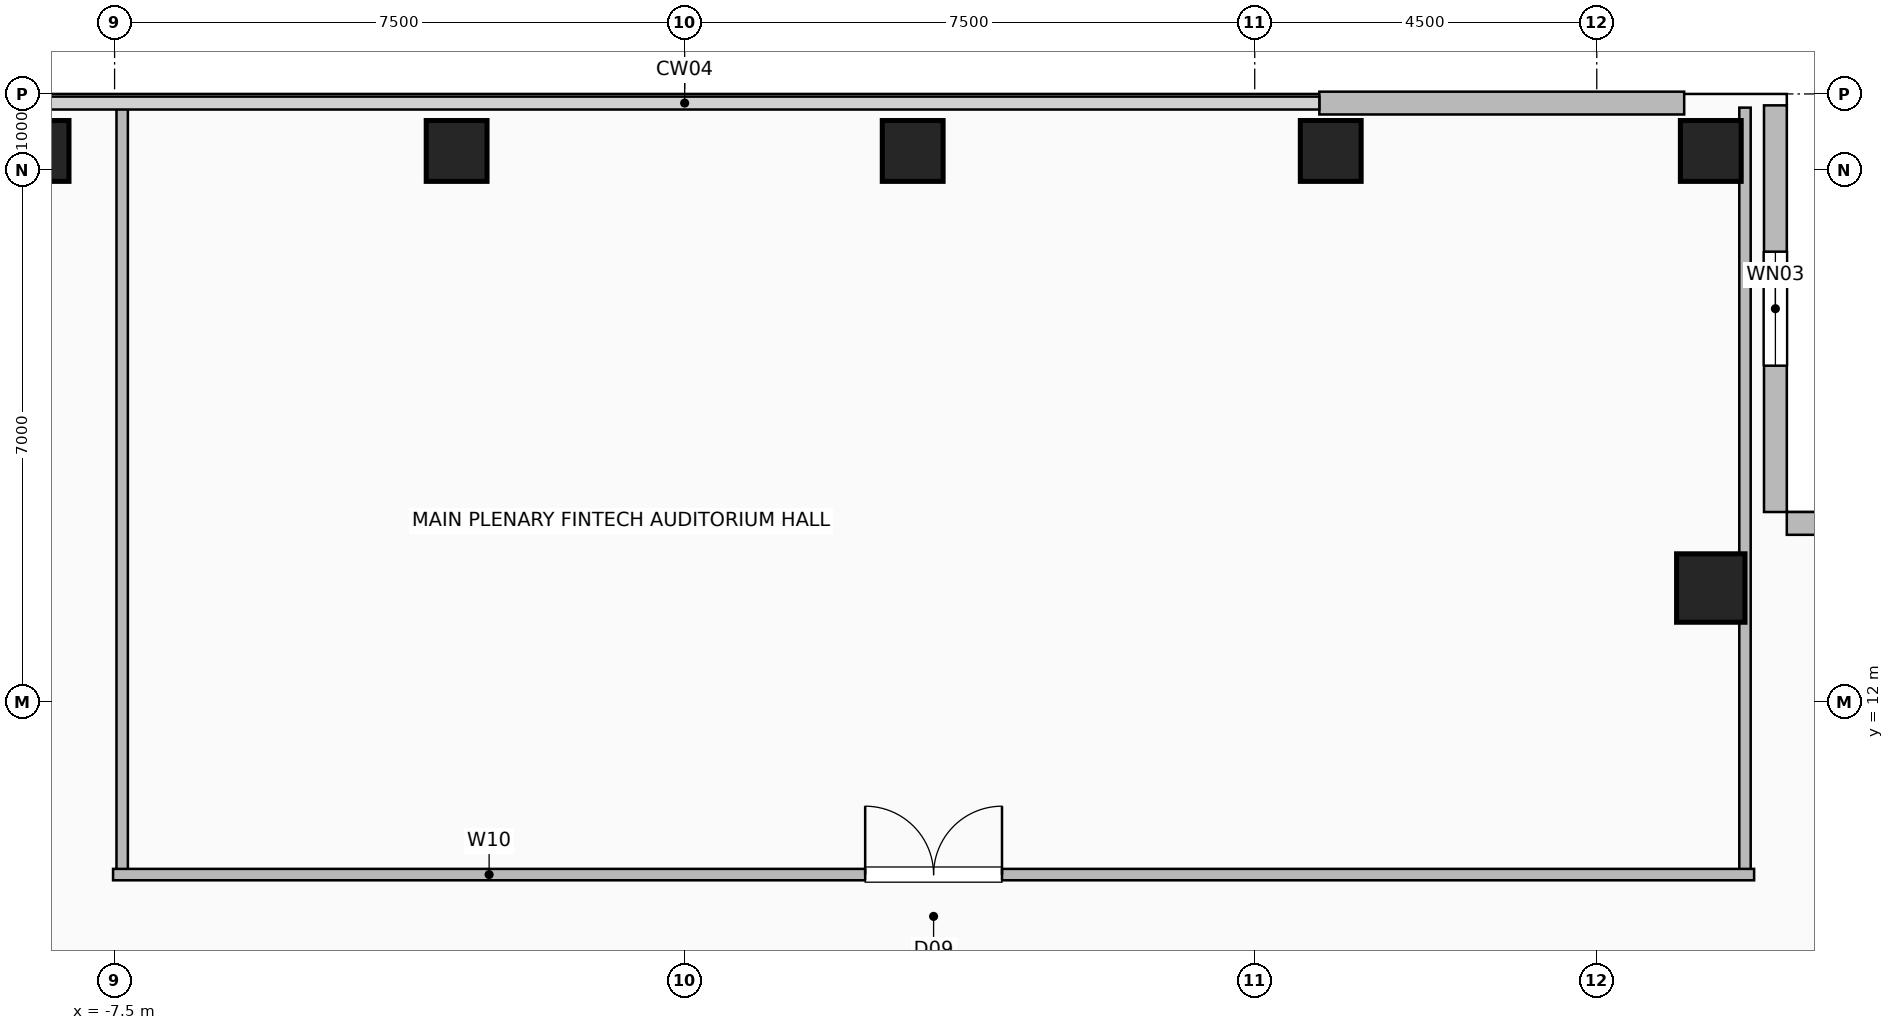
"""IFC4 building model, lengths in metres.
Left out: names, types, materials, properties, quantities, classifications, styles, units other than length and angle.
Written with IfcOpenShell. Run it as: python <this file> out.ifc"""

import sys

from ifc_helpers import new_model, si_unit, direction, frame, frame_2d, origin, origin_2d, place, context, subcontext, project, spatial, rectangle, hollow_rectangle, extrude, element, fill, save


model = new_model("IFC4")
c1 = context("Model", 3, precision=1e-05, world=origin(), true_north=direction((0.0, 1.0)))
c2 = subcontext(c1, "Body", "Model", "MODEL_VIEW")
j1 = project(units=[si_unit("LENGTHUNIT", "METRE"), si_unit("PLANEANGLEUNIT", "RADIAN")], contexts=[c1])
p1 = place(None, origin())
s1 = spatial("IfcSite", under=j1, at=p1, CompositionType="ELEMENT")
p2 = place(p1, origin())
s2 = spatial("IfcBuilding", under=s1, at=p2, CompositionType="ELEMENT")
p3 = place(p2, frame((0.0, 0.0, 213.0)))
s3 = spatial("IfcBuildingStorey", under=s2, at=p3, CompositionType="ELEMENT", Elevation=213.0)
for number, where, z_axis, x_axis in (
    (1, (-8.5, 19.25, 0.0), (0.0, 0.0, 1.0), (1.0, 0.0, 0.0)),
    (2, (-3.0, 19.25, 0.0), (0.0, 0.0, 1.0), (1.0, 0.0, 0.0)),
    (3, (3.0, 19.25, 0.0), (0.0, 0.0, 1.0), (1.0, 0.0, 0.0)),
    (4, (8.5, 19.25, 0.0), (0.0, 0.0, 1.0), (1.0, 0.0, 0.0)),
    (5, (13.5, 19.25, 0.0), (0.0, 0.0, 1.0), (1.0, 0.0, 0.0)),
):
    element("IfcColumn", number, at=place(p3, frame(where, z_axis=z_axis, x_axis=x_axis)), inside=s3, PredefinedType="COLUMN", context=c2, shape_type="SweptSolid", body=[
        extrude(hollow_rectangle(XDim=0.8, YDim=0.8, WallThickness=0.04, at=origin_2d()), origin(), (0.0, 0.0, 1.0), 3.6),
    ])
p4 = place(p3, frame((13.5, 13.5, 0.0), z_axis=(0.0, 0.0, 1.0), x_axis=(1.0, 0.0, 0.0)))
e6 = element("IfcColumn", 6, at=p4, inside=s3, PredefinedType="COLUMN", context=c2, shape_type="SweptSolid", body=[
    extrude(hollow_rectangle(XDim=0.9, YDim=0.9, WallThickness=0.045, at=origin_2d()), origin(), (0.0, 0.0, 1.0), 3.6),
])
p5 = place(p3, frame((8.35, 19.88, 0.0), z_axis=(0.0, 0.0, 1.0), x_axis=(1.0, 0.0, 0.0)))
e7 = element("IfcWall", 7, at=p5, inside=s3, PredefinedType="SOLIDWALL", context=c2, shape_type="SweptSolid", body=[
    extrude(rectangle(XDim=4.8, YDim=0.3, at=frame_2d((2.4, 0.0))), origin(), (0.0, 0.0, 1.0), 3.36),
])
p6 = place(p3, frame((14.35, 19.85, 0.0), z_axis=(0.0, 0.0, 1.0), x_axis=(0.0, -1.0, 0.0)))
e8 = element("IfcWall", 8, at=p6, inside=s3, PredefinedType="SOLIDWALL", context=c2, shape_type="SweptSolid", body=[
    extrude(rectangle(XDim=5.35, YDim=0.3, at=frame_2d((2.675, 0.0))), origin(), (0.0, 0.0, 1.0), 3.36),
])
p7 = place(p6, frame((1.925, 0.0, 0.9)))
e9 = element("IfcOpeningElement", 9, at=p7, cuts=e8, PredefinedType="OPENING", context=c2, shape_type="SweptSolid", body=[
    extrude(rectangle(XDim=1.5, YDim=1.8, at=frame_2d((0.75, 0.9))), frame((0.0, 0.16, 0.0), z_axis=(0.0, -1.0, 0.0), x_axis=(1.0, 0.0, 0.0)), (0.0, 0.0, 1.0), 0.32),
])
p8 = place(p3, frame((19.85, 14.35, 0.0), z_axis=(0.0, 0.0, 1.0), x_axis=(-1.0, 0.0, 0.0)))
e10 = element("IfcWall", 10, at=p8, inside=s3, PredefinedType="SOLIDWALL", context=c2, shape_type="SweptSolid", body=[
    extrude(rectangle(XDim=5.35, YDim=0.3, at=frame_2d((2.675, 0.0))), origin(), (0.0, 0.0, 1.0), 3.36),
])
for number, where, z_axis, x_axis in (
    (11, (-7.4, 9.73, 0.0), (0.0, 0.0, 1.0), (0.0, 1.0, 0.0)),
    (12, (13.95, 9.73, 0.0), (0.0, 0.0, 1.0), (0.0, 1.0, 0.0)),
):
    element("IfcWall", number, at=place(p3, frame(where, z_axis=z_axis, x_axis=x_axis)), inside=s3, PredefinedType="PARTITIONING", context=c2, shape_type="SweptSolid", body=[
        extrude(rectangle(XDim=10.09, YDim=0.15, at=frame_2d((5.045, 0.0))), origin(), (0.0, 0.0, 1.0), 3.36),
    ])
p9 = place(p3, frame((-7.52, 9.73, 0.0), z_axis=(0.0, 0.0, 1.0), x_axis=(1.0, 0.0, 0.0)))
e13 = element("IfcWall", 13, at=p9, inside=s3, PredefinedType="PARTITIONING", context=c2, shape_type="SweptSolid", body=[
    extrude(rectangle(XDim=21.59, YDim=0.15, at=frame_2d((10.795, 0.0))), origin(), (0.0, 0.0, 1.0), 3.36),
])
p10 = place(p9, frame((9.895, 0.0, 0.0)))
e14 = element("IfcOpeningElement", 14, at=p10, cuts=e13, PredefinedType="OPENING", context=c2, shape_type="SweptSolid", body=[
    extrude(rectangle(XDim=1.8, YDim=2.08, at=frame_2d((0.9, 1.04))), frame((0.0, 0.085, 0.0), z_axis=(0.0, -1.0, 0.0), x_axis=(1.0, 0.0, 0.0)), (0.0, 0.0, 1.0), 0.17),
])
p11 = place(p7, origin())
e15 = element("IfcWindow", 15, at=p11, inside=s3, PartitioningType="SINGLE_PANEL", PredefinedType="WINDOW", context=c2, shape_type="SweptSolid", body=[
    extrude(rectangle(XDim=1.5, YDim=1.8, at=frame_2d((0.75, 0.9))), frame((0.0, 0.03, 0.0), z_axis=(0.0, -1.0, 0.0), x_axis=(1.0, 0.0, 0.0)), (0.0, 0.0, 1.0), 0.06),
])
fill(e9, e15)
p12 = place(p10, origin())
e16 = element("IfcDoor", 16, at=p12, inside=s3, OperationType="DOUBLE_DOOR_SINGLE_SWING", PredefinedType="DOOR", context=c2, shape_type="SweptSolid", body=[
    extrude(rectangle(XDim=1.8, YDim=2.08, at=frame_2d((0.9, 1.04))), frame((0.0, 0.025, 0.0), z_axis=(0.0, -1.0, 0.0), x_axis=(1.0, 0.0, 0.0)), (0.0, 0.0, 1.0), 0.05),
])
fill(e14, e16)
save(model, sys.argv[1])
